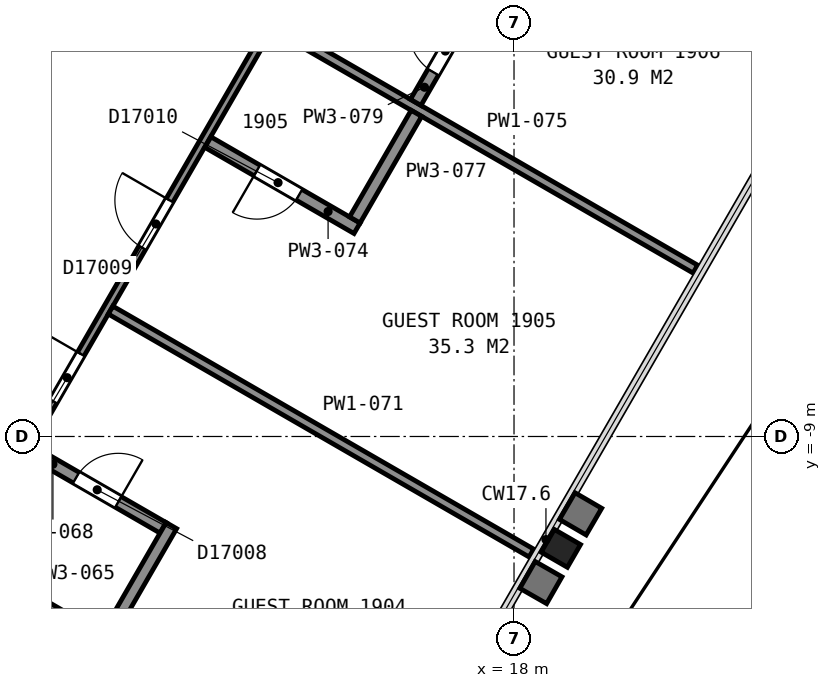
"""IFC4 building model, lengths in metres.
Left out: names, types, materials, properties, quantities, classifications, styles, units other than length and angle.
Written with IfcOpenShell. Run it as: python <this file> out.ifc"""

import sys

from ifc_helpers import new_model, si_unit, direction, frame, frame_2d, origin, origin_2d, place, context, subcontext, project, spatial, rectangle, i_section, extrude, element, fill, save


model = new_model("IFC4")
c1 = context("Model", 3, precision=1e-05, world=origin(), true_north=direction((0.0, 1.0)))
c2 = subcontext(c1, "Body", "Model", "MODEL_VIEW")
j1 = project(units=[si_unit("LENGTHUNIT", "METRE"), si_unit("PLANEANGLEUNIT", "RADIAN")], contexts=[c1])
p1 = place(None, origin())
s1 = spatial("IfcSite", under=j1, at=p1, CompositionType="ELEMENT")
p2 = place(p1, origin())
s2 = spatial("IfcBuilding", under=s1, at=p2, CompositionType="ELEMENT")
p3 = place(p2, frame((0.0, 0.0, 83.6)))
s3 = spatial("IfcBuildingStorey", under=s2, at=p3, CompositionType="ELEMENT", Elevation=83.6)
p4 = place(p3, frame((18.77, -10.84, 0.0), z_axis=(0.0, 0.0, 1.0), x_axis=(-0.5, -0.866025403784, 0.0)))
e1 = element("IfcColumn", 1, at=p4, inside=s3, PredefinedType="COLUMN", context=c2, shape_type="SweptSolid", body=[
    extrude(i_section(OverallWidth=0.432, OverallDepth=0.498, WebThickness=0.056, FlangeThickness=0.089, FilletRadius=0.015, at=origin_2d()), origin(), (0.0, 0.0, 1.0), 2.87),
])
p5 = place(p3, frame((8.492, -3.012, 0.0), z_axis=(0.0, 0.0, 1.0), x_axis=(0.499972957231, 0.866041016371, 0.0)))
e2 = element("IfcWall", 2, at=p5, inside=s3, PredefinedType="PARTITIONING", context=c2, shape_type="SweptSolid", body=[
    extrude(rectangle(XDim=10.349, YDim=0.2, at=frame_2d((5.174, 0.0))), origin(), (0.0, 0.0, 1.0), 3.35),
])
p6 = place(p3, frame((19.456, 7.217, 0.0), z_axis=(0.0, 0.0, 1.0), x_axis=(-0.50002170027, -0.866012874765, 0.0)))
e3 = element("IfcWall", 3, at=p6, inside=s3, PredefinedType="PARTITIONING", context=c2, shape_type="SweptSolid", body=[
    extrude(rectangle(XDim=31.379, YDim=0.125, at=frame_2d((15.69, 0.0))), origin(), (0.0, 0.0, 1.0), 2.262),
])
p7 = place(p6, frame((26.843, 0.0, 0.0)))
e4 = element("IfcOpeningElement", 4, at=p7, cuts=e3, PredefinedType="OPENING", context=c2, shape_type="SweptSolid", body=[
    extrude(rectangle(XDim=1.0, YDim=2.1, at=frame_2d((0.5, 1.05))), frame((0.0, 0.073, 0.0), z_axis=(0.0, -1.0, 0.0), x_axis=(1.0, 0.0, 0.0)), (0.0, 0.0, 1.0), 0.145),
])
p8 = place(p6, frame((24.03, 0.0, 0.0)))
e5 = element("IfcOpeningElement", 5, at=p8, cuts=e3, PredefinedType="OPENING", context=c2, shape_type="SweptSolid", body=[
    extrude(rectangle(XDim=0.9, YDim=2.1, at=frame_2d((0.45, 1.05))), frame((0.0, 0.073, 0.0), z_axis=(0.0, -1.0, 0.0), x_axis=(1.0, 0.0, 0.0)), (0.0, 0.0, 1.0), 0.145),
])
p9 = place(p6, frame((17.159, 0.0, 0.0)))
e6 = element("IfcOpeningElement", 6, at=p9, cuts=e3, PredefinedType="OPENING", context=c2, shape_type="SweptSolid", body=[
    extrude(rectangle(XDim=0.9, YDim=2.1, at=frame_2d((0.45, 1.05))), frame((0.0, 0.073, 0.0), z_axis=(0.0, -1.0, 0.0), x_axis=(1.0, 0.0, 0.0)), (0.0, 0.0, 1.0), 0.145),
])
p10 = place(p6, frame((14.24, 0.0, 0.0)))
e7 = element("IfcOpeningElement", 7, at=p10, cuts=e3, PredefinedType="OPENING", context=c2, shape_type="SweptSolid", body=[
    extrude(rectangle(XDim=0.9, YDim=2.1, at=frame_2d((0.45, 1.05))), frame((0.0, 0.073, 0.0), z_axis=(0.0, -1.0, 0.0), x_axis=(1.0, 0.0, 0.0)), (0.0, 0.0, 1.0), 0.145),
])
p11 = place(p6, frame((6.997, 0.0, 0.0)))
e8 = element("IfcOpeningElement", 8, at=p11, cuts=e3, PredefinedType="OPENING", context=c2, shape_type="SweptSolid", body=[
    extrude(rectangle(XDim=0.9, YDim=2.1, at=frame_2d((0.45, 1.05))), frame((0.0, 0.073, 0.0), z_axis=(0.0, -1.0, 0.0), x_axis=(1.0, 0.0, 0.0)), (0.0, 0.0, 1.0), 0.145),
])
p12 = place(p6, frame((4.327, 0.0, 0.0)))
e9 = element("IfcOpeningElement", 9, at=p12, cuts=e3, PredefinedType="OPENING", context=c2, shape_type="SweptSolid", body=[
    extrude(rectangle(XDim=0.9, YDim=2.1, at=frame_2d((0.45, 1.05))), frame((0.0, 0.073, 0.0), z_axis=(0.0, -1.0, 0.0), x_axis=(1.0, 0.0, 0.0)), (0.0, 0.0, 1.0), 0.145),
])
p13 = place(p3, frame((8.98, -11.052, 0.0), z_axis=(0.0, 0.0, 1.0), x_axis=(0.865990087344, -0.500061164881, 0.0)))
e10 = element("IfcWall", 10, at=p13, inside=s3, PredefinedType="PARTITIONING", context=c2, shape_type="SweptSolid", body=[
    extrude(rectangle(XDim=2.537, YDim=0.2, at=frame_2d((1.269, 0.0))), origin(), (0.0, 0.0, 1.0), 2.262),
])
p14 = place(p3, frame((12.228, -10.502, 0.0), z_axis=(0.0, 0.0, 1.0), x_axis=(-0.866111763775, 0.499850390267, 0.0)))
e11 = element("IfcWall", 11, at=p14, inside=s3, PredefinedType="PARTITIONING", context=c2, shape_type="SweptSolid", body=[
    extrude(rectangle(XDim=2.533, YDim=0.2, at=frame_2d((1.267, 0.0))), origin(), (0.0, 0.0, 1.0), 2.262),
])
p15 = place(p14, frame((0.851, 0.0, 0.0)))
e12 = element("IfcOpeningElement", 12, at=p15, cuts=e11, PredefinedType="OPENING", context=c2, shape_type="SweptSolid", body=[
    extrude(rectangle(XDim=0.8, YDim=2.1, at=frame_2d((0.4, 1.05))), frame((0.0, 0.11, 0.0), z_axis=(0.0, -1.0, 0.0), x_axis=(1.0, 0.0, 0.0)), (0.0, 0.0, 1.0), 0.22),
])
p16 = place(p3, frame((10.164, -14.276, 0.0), z_axis=(0.0, 0.0, 1.0), x_axis=(0.50017868667, 0.865922214405, 0.0)))
e13 = element("IfcWall", 13, at=p16, inside=s3, PredefinedType="PARTITIONING", context=c2, shape_type="SweptSolid", body=[
    extrude(rectangle(XDim=4.4, YDim=0.2, at=frame_2d((2.2, 0.0))), origin(), (0.0, 0.0, 1.0), 2.262),
])
p17 = place(p3, frame((11.365, -6.921, 0.0), z_axis=(0.0, 0.0, 1.0), x_axis=(0.866008543052, -0.500029202507, 0.0)))
e14 = element("IfcWall", 14, at=p17, inside=s3, PredefinedType="PARTITIONING", context=c2, shape_type="SweptSolid", body=[
    extrude(rectangle(XDim=7.992, YDim=0.15, at=frame_2d((3.996, 0.0))), origin(), (0.0, 0.0, 1.0), 2.262),
])
p18 = place(p3, frame((12.966, -4.159, 0.0), z_axis=(0.0, 0.0, 1.0), x_axis=(0.866033446572, -0.499986069224, 0.0)))
e15 = element("IfcWall", 15, at=p18, inside=s3, PredefinedType="PARTITIONING", context=c2, shape_type="SweptSolid", body=[
    extrude(rectangle(XDim=2.833, YDim=0.2, at=frame_2d((1.416, 0.0))), origin(), (0.0, 0.0, 1.0), 2.262),
])
p19 = place(p18, frame((0.933, 0.0, 0.0)))
e16 = element("IfcOpeningElement", 16, at=p19, cuts=e15, PredefinedType="OPENING", context=c2, shape_type="SweptSolid", body=[
    extrude(rectangle(XDim=0.8, YDim=2.1, at=frame_2d((0.4, 1.05))), frame((0.0, 0.11, 0.0), z_axis=(0.0, -1.0, 0.0), x_axis=(1.0, 0.0, 0.0)), (0.0, 0.0, 1.0), 0.22),
])
p20 = place(p3, frame((14.065, -2.254, 0.0), z_axis=(0.0, 0.0, 1.0), x_axis=(0.866045096311, -0.499965889992, 0.0)))
e17 = element("IfcWall", 17, at=p20, inside=s3, PredefinedType="PARTITIONING", context=c2, shape_type="SweptSolid", body=[
    extrude(rectangle(XDim=7.987, YDim=0.15, at=frame_2d((3.993, 0.0))), origin(), (0.0, 0.0, 1.0), 2.262),
])
p21 = place(p3, frame((15.382, -5.438, 0.0), z_axis=(0.0, 0.0, 1.0), x_axis=(0.500042536776, 0.866000843773, 0.0)))
e18 = element("IfcWall", 18, at=p21, inside=s3, PredefinedType="PARTITIONING", context=c2, shape_type="SweptSolid", body=[
    extrude(rectangle(XDim=2.025, YDim=0.2, at=frame_2d((1.012, 0.0))), origin(), (0.0, 0.0, 1.0), 2.262),
])
p22 = place(p3, frame((16.384, -3.505, 0.0), z_axis=(0.0, 0.0, 1.0), x_axis=(0.499876134923, 0.86609690551, 0.0)))
e19 = element("IfcWall", 19, at=p22, inside=s3, PredefinedType="PARTITIONING", context=c2, shape_type="SweptSolid", body=[
    extrude(rectangle(XDim=1.925, YDim=0.2, at=frame_2d((0.963, 0.0))), origin(), (0.0, 0.0, 1.0), 2.262),
])
p23 = place(p22, frame((0.575, 0.0, 0.0)))
e20 = element("IfcOpeningElement", 20, at=p23, cuts=e19, PredefinedType="OPENING", context=c2, shape_type="SweptSolid", body=[
    extrude(rectangle(XDim=0.8, YDim=2.1, at=frame_2d((0.4, 1.05))), frame((0.0, 0.11, 0.0), z_axis=(0.0, -1.0, 0.0), x_axis=(1.0, 0.0, 0.0)), (0.0, 0.0, 1.0), 0.22),
])
p24 = place(p9, origin())
e21 = element("IfcDoor", 21, at=p24, inside=s3, OperationType="SINGLE_SWING_LEFT", PredefinedType="DOOR", context=c2, shape_type="SweptSolid", body=[
    extrude(rectangle(XDim=0.9, YDim=2.1, at=frame_2d((0.45, 1.05))), frame((0.0, 0.025, 0.0), z_axis=(0.0, -1.0, 0.0), x_axis=(1.0, 0.0, 0.0)), (0.0, 0.0, 1.0), 0.05),
])
fill(e6, e21)
p25 = place(p10, origin())
e22 = element("IfcDoor", 22, at=p25, inside=s3, OperationType="SINGLE_SWING_LEFT", PredefinedType="DOOR", context=c2, shape_type="SweptSolid", body=[
    extrude(rectangle(XDim=0.9, YDim=2.1, at=frame_2d((0.45, 1.05))), frame((0.0, 0.025, 0.0), z_axis=(0.0, -1.0, 0.0), x_axis=(1.0, 0.0, 0.0)), (0.0, 0.0, 1.0), 0.05),
])
fill(e7, e22)
p26 = place(p15, origin())
e23 = element("IfcDoor", 23, at=p26, inside=s3, OperationType="SINGLE_SWING_LEFT", PredefinedType="DOOR", context=c2, shape_type="SweptSolid", body=[
    extrude(rectangle(XDim=0.8, YDim=2.1, at=frame_2d((0.4, 1.05))), frame((0.0, 0.025, 0.0), z_axis=(0.0, -1.0, 0.0), x_axis=(1.0, 0.0, 0.0)), (0.0, 0.0, 1.0), 0.05),
])
fill(e12, e23)
p27 = place(p19, origin())
e24 = element("IfcDoor", 24, at=p27, inside=s3, OperationType="SINGLE_SWING_LEFT", PredefinedType="DOOR", context=c2, shape_type="SweptSolid", body=[
    extrude(rectangle(XDim=0.8, YDim=2.1, at=frame_2d((0.4, 1.05))), frame((0.0, 0.025, 0.0), z_axis=(0.0, -1.0, 0.0), x_axis=(1.0, 0.0, 0.0)), (0.0, 0.0, 1.0), 0.05),
])
fill(e16, e24)
p28 = place(p23, origin())
e25 = element("IfcDoor", 25, at=p28, inside=s3, OperationType="SINGLE_SWING_RIGHT", PredefinedType="DOOR", context=c2, shape_type="SweptSolid", body=[
    extrude(rectangle(XDim=0.8, YDim=2.1, at=frame_2d((0.4, 1.05))), frame((0.0, 0.025, 0.0), z_axis=(0.0, -1.0, 0.0), x_axis=(1.0, 0.0, 0.0)), (0.0, 0.0, 1.0), 0.05),
])
fill(e20, e25)
save(model, sys.argv[1])
